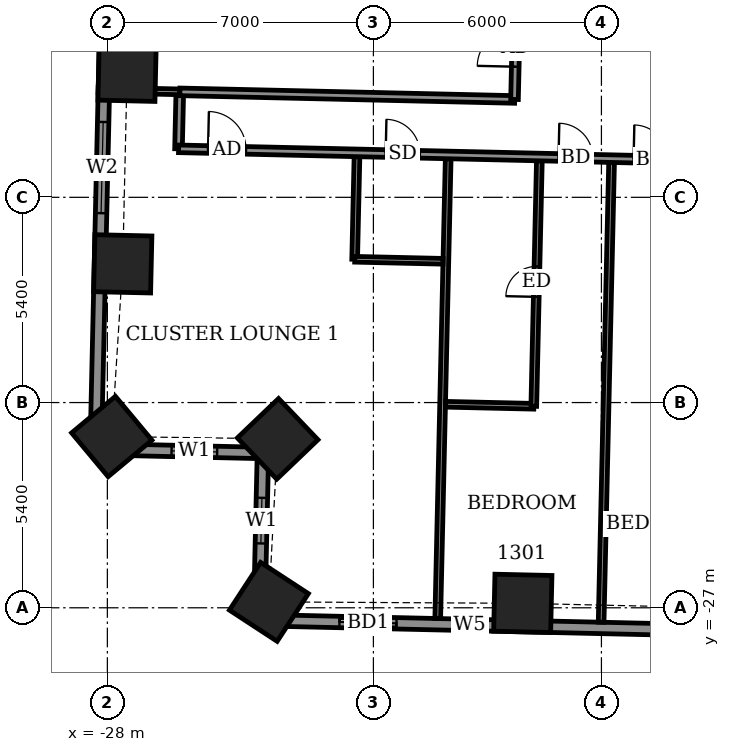
"""IFC4 building model, lengths in metres.
Left out: names, types, materials, properties, quantities, classifications, styles, units other than length and angle.
Written with IfcOpenShell. Run it as: python <this file> out.ifc"""

import sys

from ifc_helpers import new_model, si_unit, direction, frame, frame_2d, origin, origin_2d, place, context, subcontext, project, spatial, rectangle, extrude, element, fill, save


model = new_model("IFC4")
c1 = context("Model", 3, precision=1e-05, world=origin(), true_north=direction((0.0, 1.0)))
c2 = subcontext(c1, "Body", "Model", "MODEL_VIEW")
j1 = project(units=[si_unit("LENGTHUNIT", "METRE"), si_unit("PLANEANGLEUNIT", "RADIAN")], contexts=[c1])
p1 = place(None, origin())
s1 = spatial("IfcSite", under=j1, at=p1, CompositionType="ELEMENT")
p2 = place(p1, origin())
s2 = spatial("IfcBuilding", under=s1, at=p2, CompositionType="ELEMENT")
p3 = place(p2, frame((0.0, 0.0, 56.7)))
s3 = spatial("IfcBuildingStorey", under=s2, at=p3, CompositionType="ELEMENT", Elevation=56.7)
for number, where, z_axis, x_axis in (
    (1, (-27.481, -12.91, -0.55), (0.0, 0.0, 1.0), (-0.023, -1.0, 0.0)),
    (2, (-27.595, -17.95, -0.55), (0.0, 0.0, 1.0), (-0.023, -1.0, 0.0)),
    (3, (-27.884, -22.494, -0.55), (0.0, 0.0, 1.0), (0.64, -0.768, 0.0)),
    (4, (-23.519, -22.555, -0.55), (0.0, 0.0, 1.0), (0.691, -0.723, 0.0)),
    (5, (-23.75, -26.844, -0.55), (0.0, 0.0, 1.0), (0.837, -0.547, 0.0)),
    (6, (-17.069, -26.883, -0.55), (0.0, 0.0, 1.0), (1.0, -0.023, 0.0)),
):
    element("IfcColumn", number, at=place(p3, frame(where, z_axis=z_axis, x_axis=x_axis)), inside=s3, PredefinedType="COLUMN", context=c2, shape_type="SweptSolid", body=[
        extrude(rectangle(XDim=1.5, YDim=1.5, at=origin_2d()), origin(), (0.0, 0.0, 1.0), 3.6),
    ])
p4 = place(p3, frame((-27.965, -7.802, 0.0), z_axis=(0.0, 0.0, 1.0), x_axis=(-0.02267786199, -0.999742824218, 0.0)))
e7 = element("IfcWall", 7, at=p4, inside=s3, PredefinedType="SOLIDWALL", context=c2, shape_type="SweptSolid", body=[
    extrude(rectangle(XDim=15.029, YDim=0.3, at=frame_2d((7.514, 0.0))), origin(), (0.0, 0.0, 1.0), 3.05),
])
p5 = place(p4, frame((1.826, 0.0, 0.0)))
e8 = element("IfcOpeningElement", 8, at=p5, cuts=e7, PredefinedType="OPENING", context=c2, shape_type="SweptSolid", body=[
    extrude(rectangle(XDim=1.5, YDim=2.4, at=frame_2d((0.75, 1.2))), frame((0.0, 0.16, 0.0), z_axis=(0.0, -1.0, 0.0), x_axis=(1.0, 0.0, 0.0)), (0.0, 0.0, 1.0), 0.32),
])
p6 = place(p4, frame((6.417, 0.0, 0.9)))
e9 = element("IfcOpeningElement", 9, at=p6, cuts=e7, PredefinedType="OPENING", context=c2, shape_type="SweptSolid", body=[
    extrude(rectangle(XDim=2.4, YDim=1.5, at=frame_2d((1.2, 0.75))), frame((0.0, 0.16, 0.0), z_axis=(0.0, -1.0, 0.0), x_axis=(1.0, 0.0, 0.0)), (0.0, 0.0, 1.0), 0.32),
])
p7 = place(p3, frame((-28.306, -22.827, 0.0), z_axis=(0.0, 0.0, 1.0), x_axis=(0.999741204967, -0.022749133868, 0.0)))
e10 = element("IfcWall", 10, at=p7, inside=s3, PredefinedType="SOLIDWALL", context=c2, shape_type="SweptSolid", body=[
    extrude(rectangle(XDim=4.4, YDim=0.3, at=frame_2d((2.2, 0.0))), origin(), (0.0, 0.0, 1.0), 3.05),
])
p8 = place(p7, frame((1.996, 0.0, 0.9)))
e11 = element("IfcOpeningElement", 11, at=p8, cuts=e10, PredefinedType="OPENING", context=c2, shape_type="SweptSolid", body=[
    extrude(rectangle(XDim=1.2, YDim=1.5, at=frame_2d((0.6, 0.75))), frame((0.0, 0.16, 0.0), z_axis=(0.0, -1.0, 0.0), x_axis=(1.0, 0.0, 0.0)), (0.0, 0.0, 1.0), 0.32),
])
p9 = place(p3, frame((-23.907, -22.927, 0.0), z_axis=(0.0, 0.0, 1.0), x_axis=(-0.022749133868, -0.999741204967, 0.0)))
e12 = element("IfcWall", 12, at=p9, inside=s3, PredefinedType="SOLIDWALL", context=c2, shape_type="SweptSolid", body=[
    extrude(rectangle(XDim=4.4, YDim=0.3, at=frame_2d((2.2, 0.0))), origin(), (0.0, 0.0, 1.0), 2.55),
])
p10 = place(p9, frame((1.18, 0.0, 0.9)))
e13 = element("IfcOpeningElement", 13, at=p10, cuts=e12, PredefinedType="OPENING", context=c2, shape_type="SweptSolid", body=[
    extrude(rectangle(XDim=1.2, YDim=1.5, at=frame_2d((0.6, 0.75))), frame((0.0, 0.16, 0.0), z_axis=(0.0, -1.0, 0.0), x_axis=(1.0, 0.0, 0.0)), (0.0, 0.0, 1.0), 0.32),
])
p11 = place(p3, frame((-24.007, -27.326, 0.0), z_axis=(0.0, 0.0, 1.0), x_axis=(0.999742536491, -0.022690542744, 0.0)))
e14 = element("IfcWall", 14, at=p11, inside=s3, PredefinedType="SOLIDWALL", context=c2, shape_type="SweptSolid", body=[
    extrude(rectangle(XDim=49.236, YDim=0.3, at=frame_2d((24.618, 0.0))), origin(), (0.0, 0.0, 1.0), 3.05),
])
p12 = place(p11, frame((2.115, 0.0, 0.0)))
e15 = element("IfcOpeningElement", 15, at=p12, cuts=e14, PredefinedType="OPENING", context=c2, shape_type="SweptSolid", body=[
    extrude(rectangle(XDim=1.5, YDim=2.4, at=frame_2d((0.75, 1.2))), frame((0.0, 0.16, 0.0), z_axis=(0.0, -1.0, 0.0), x_axis=(1.0, 0.0, 0.0)), (0.0, 0.0, 1.0), 0.32),
])
p13 = place(p11, frame((5.088, 0.0, 0.9)))
e16 = element("IfcOpeningElement", 16, at=p13, cuts=e14, PredefinedType="OPENING", context=c2, shape_type="SweptSolid", body=[
    extrude(rectangle(XDim=0.9, YDim=1.5, at=frame_2d((0.45, 0.75))), frame((0.0, 0.16, 0.0), z_axis=(0.0, -1.0, 0.0), x_axis=(1.0, 0.0, 0.0)), (0.0, 0.0, 1.0), 0.32),
])
p14 = place(p11, frame((10.475, 0.0, 0.0)))
e17 = element("IfcOpeningElement", 17, at=p14, cuts=e14, PredefinedType="OPENING", context=c2, shape_type="SweptSolid", body=[
    extrude(rectangle(XDim=1.5, YDim=2.4, at=frame_2d((0.75, 1.2))), frame((0.0, 0.16, 0.0), z_axis=(0.0, -1.0, 0.0), x_axis=(1.0, 0.0, 0.0)), (0.0, 0.0, 1.0), 0.32),
])
p15 = place(p11, frame((15.477, 0.0, 0.0)))
e18 = element("IfcOpeningElement", 18, at=p15, cuts=e14, PredefinedType="OPENING", context=c2, shape_type="SweptSolid", body=[
    extrude(rectangle(XDim=1.5, YDim=2.4, at=frame_2d((0.75, 1.2))), frame((0.0, 0.16, 0.0), z_axis=(0.0, -1.0, 0.0), x_axis=(1.0, 0.0, 0.0)), (0.0, 0.0, 1.0), 0.32),
])
p16 = place(p11, frame((18.515, 0.0, 0.0)))
e19 = element("IfcOpeningElement", 19, at=p16, cuts=e14, PredefinedType="OPENING", context=c2, shape_type="SweptSolid", body=[
    extrude(rectangle(XDim=1.5, YDim=2.4, at=frame_2d((0.75, 1.2))), frame((0.0, 0.16, 0.0), z_axis=(0.0, -1.0, 0.0), x_axis=(1.0, 0.0, 0.0)), (0.0, 0.0, 1.0), 0.32),
])
p17 = place(p11, frame((23.825, 0.0, 0.0)))
e20 = element("IfcOpeningElement", 20, at=p17, cuts=e14, PredefinedType="OPENING", context=c2, shape_type="SweptSolid", body=[
    extrude(rectangle(XDim=1.5, YDim=2.4, at=frame_2d((0.75, 1.2))), frame((0.0, 0.16, 0.0), z_axis=(0.0, -1.0, 0.0), x_axis=(1.0, 0.0, 0.0)), (0.0, 0.0, 1.0), 0.32),
])
p18 = place(p11, frame((29.128, 0.0, 0.0)))
e21 = element("IfcOpeningElement", 21, at=p18, cuts=e14, PredefinedType="OPENING", context=c2, shape_type="SweptSolid", body=[
    extrude(rectangle(XDim=1.5, YDim=2.4, at=frame_2d((0.75, 1.2))), frame((0.0, 0.16, 0.0), z_axis=(0.0, -1.0, 0.0), x_axis=(1.0, 0.0, 0.0)), (0.0, 0.0, 1.0), 0.32),
])
p19 = place(p11, frame((32.166, 0.0, 0.0)))
e22 = element("IfcOpeningElement", 22, at=p19, cuts=e14, PredefinedType="OPENING", context=c2, shape_type="SweptSolid", body=[
    extrude(rectangle(XDim=1.5, YDim=2.4, at=frame_2d((0.75, 1.2))), frame((0.0, 0.16, 0.0), z_axis=(0.0, -1.0, 0.0), x_axis=(1.0, 0.0, 0.0)), (0.0, 0.0, 1.0), 0.32),
])
p20 = place(p11, frame((37.091, 0.0, 0.0)))
e23 = element("IfcOpeningElement", 23, at=p20, cuts=e14, PredefinedType="OPENING", context=c2, shape_type="SweptSolid", body=[
    extrude(rectangle(XDim=1.5, YDim=2.4, at=frame_2d((0.75, 1.2))), frame((0.0, 0.16, 0.0), z_axis=(0.0, -1.0, 0.0), x_axis=(1.0, 0.0, 0.0)), (0.0, 0.0, 1.0), 0.32),
])
p21 = place(p11, frame((40.205, 0.0, 0.0)))
e24 = element("IfcOpeningElement", 24, at=p21, cuts=e14, PredefinedType="OPENING", context=c2, shape_type="SweptSolid", body=[
    extrude(rectangle(XDim=1.2, YDim=2.4, at=frame_2d((0.6, 1.2))), frame((0.0, 0.16, 0.0), z_axis=(0.0, -1.0, 0.0), x_axis=(1.0, 0.0, 0.0)), (0.0, 0.0, 1.0), 0.32),
])
p22 = place(p11, frame((45.047, 0.0, 0.9)))
e25 = element("IfcOpeningElement", 25, at=p22, cuts=e14, PredefinedType="OPENING", context=c2, shape_type="SweptSolid", body=[
    extrude(rectangle(XDim=2.4, YDim=1.5, at=frame_2d((1.2, 0.75))), frame((0.0, 0.16, 0.0), z_axis=(0.0, -1.0, 0.0), x_axis=(1.0, 0.0, 0.0)), (0.0, 0.0, 1.0), 0.32),
])
p23 = place(p3, frame((-19.307, -27.283, 0.0), z_axis=(0.0, 0.0, 1.0), x_axis=(0.022717280737, 0.999741929278, 0.0)))
e26 = element("IfcWall", 26, at=p23, inside=s3, PredefinedType="PARTITIONING", context=c2, shape_type="SweptSolid", body=[
    extrude(rectangle(XDim=12.101, YDim=0.15, at=frame_2d((6.051, 0.0))), origin(), (0.0, 0.0, 1.0), 2.55),
])
p24 = place(p3, frame((-15.008, -27.38, 0.0), z_axis=(0.0, 0.0, 1.0), x_axis=(0.02273928012, 0.99974142914, 0.0)))
e27 = element("IfcWall", 27, at=p24, inside=s3, PredefinedType="PARTITIONING", context=c2, shape_type="SweptSolid", body=[
    extrude(rectangle(XDim=12.1, YDim=0.15, at=frame_2d((6.05, 0.0))), origin(), (0.0, 0.0, 1.0), 2.55),
])
p25 = place(p3, frame((-19.102, -21.645, 0.0), z_axis=(0.0, 0.0, 1.0), x_axis=(0.999740260747, -0.02279059109, 0.0)))
e28 = element("IfcWall", 28, at=p25, inside=s3, PredefinedType="PARTITIONING", context=c2, shape_type="SweptSolid", body=[
    extrude(rectangle(XDim=2.324, YDim=0.15, at=frame_2d((1.162, 0.0))), origin(), (0.0, 0.0, 1.0), 3.05),
])
p26 = place(p3, frame((-16.78, -21.698, 0.0), z_axis=(0.0, 0.0, 1.0), x_axis=(0.022752312182, 0.999741132639, 0.0)))
e29 = element("IfcWall", 29, at=p26, inside=s3, PredefinedType="PARTITIONING", context=c2, shape_type="SweptSolid", body=[
    extrude(rectangle(XDim=6.46, YDim=0.15, at=frame_2d((3.23, 0.0))), origin(), (0.0, 0.0, 1.0), 3.05),
])
p27 = place(p26, frame((2.88, 0.0, 0.0)))
e30 = element("IfcOpeningElement", 30, at=p27, cuts=e29, PredefinedType="OPENING", context=c2, shape_type="SweptSolid", body=[
    extrude(rectangle(XDim=0.8, YDim=2.1, at=frame_2d((0.4, 1.05))), frame((0.0, 0.085, 0.0), z_axis=(0.0, -1.0, 0.0), x_axis=(1.0, 0.0, 0.0)), (0.0, 0.0, 1.0), 0.17),
])
p28 = place(p3, frame((-21.493, -17.83, 0.0), z_axis=(0.0, 0.0, 1.0), x_axis=(0.02260842146, 0.999744396973, 0.0)))
e31 = element("IfcWall", 31, at=p28, inside=s3, PredefinedType="PARTITIONING", context=c2, shape_type="SweptSolid", body=[
    extrude(rectangle(XDim=2.7, YDim=0.15, at=frame_2d((1.35, 0.0))), origin(), (0.0, 0.0, 1.0), 3.05),
])
p29 = place(p3, frame((-21.491, -17.83, 0.0), z_axis=(0.0, 0.0, 1.0), x_axis=(0.999740260747, -0.02279059109, 0.0)))
e32 = element("IfcWall", 32, at=p29, inside=s3, PredefinedType="PARTITIONING", context=c2, shape_type="SweptSolid", body=[
    extrude(rectangle(XDim=2.324, YDim=0.15, at=frame_2d((1.162, 0.0))), origin(), (0.0, 0.0, 1.0), 3.05),
])
p30 = place(p3, frame((-26.128, -14.924, 0.0), z_axis=(0.0, 0.0, 1.0), x_axis=(0.022632637625, 0.99974384905, 0.0)))
e33 = element("IfcWall", 33, at=p30, inside=s3, PredefinedType="PARTITIONING", context=c2, shape_type="SweptSolid", body=[
    extrude(rectangle(XDim=1.5, YDim=0.2, at=frame_2d((0.75, 0.0))), origin(), (0.0, 0.0, 1.0), 3.05),
])
p31 = place(p3, frame((-26.126, -14.924, 0.0), z_axis=(0.0, 0.0, 1.0), x_axis=(0.999742687583, -0.0226838847, 0.0)))
e34 = element("IfcWall", 34, at=p31, inside=s3, PredefinedType="PARTITIONING", context=c2, shape_type="SweptSolid", body=[
    extrude(rectangle(XDim=54.836, YDim=0.2, at=frame_2d((27.418, 0.0))), origin(), (0.0, 0.0, 1.0), 3.05),
])
p32 = place(p31, frame((0.775, 0.0, 0.0)))
e35 = element("IfcOpeningElement", 35, at=p32, cuts=e34, PredefinedType="OPENING", context=c2, shape_type="SweptSolid", body=[
    extrude(rectangle(XDim=1.0, YDim=2.1, at=frame_2d((0.5, 1.05))), frame((0.0, 0.11, 0.0), z_axis=(0.0, -1.0, 0.0), x_axis=(1.0, 0.0, 0.0)), (0.0, 0.0, 1.0), 0.22),
])
p33 = place(p31, frame((5.45, 0.0, 0.0)))
e36 = element("IfcOpeningElement", 36, at=p33, cuts=e34, PredefinedType="OPENING", context=c2, shape_type="SweptSolid", body=[
    extrude(rectangle(XDim=0.9, YDim=2.1, at=frame_2d((0.45, 1.05))), frame((0.0, 0.11, 0.0), z_axis=(0.0, -1.0, 0.0), x_axis=(1.0, 0.0, 0.0)), (0.0, 0.0, 1.0), 0.22),
])
p34 = place(p31, frame((10.0, 0.0, 0.0)))
e37 = element("IfcOpeningElement", 37, at=p34, cuts=e34, PredefinedType="OPENING", context=c2, shape_type="SweptSolid", body=[
    extrude(rectangle(XDim=0.9, YDim=2.1, at=frame_2d((0.45, 1.05))), frame((0.0, 0.11, 0.0), z_axis=(0.0, -1.0, 0.0), x_axis=(1.0, 0.0, 0.0)), (0.0, 0.0, 1.0), 0.22),
])
p35 = place(p31, frame((11.975, 0.0, 0.0)))
e38 = element("IfcOpeningElement", 38, at=p35, cuts=e34, PredefinedType="OPENING", context=c2, shape_type="SweptSolid", body=[
    extrude(rectangle(XDim=0.9, YDim=2.1, at=frame_2d((0.45, 1.05))), frame((0.0, 0.11, 0.0), z_axis=(0.0, -1.0, 0.0), x_axis=(1.0, 0.0, 0.0)), (0.0, 0.0, 1.0), 0.22),
])
p36 = place(p31, frame((18.85, 0.0, 0.0)))
e39 = element("IfcOpeningElement", 39, at=p36, cuts=e34, PredefinedType="OPENING", context=c2, shape_type="SweptSolid", body=[
    extrude(rectangle(XDim=0.9, YDim=2.1, at=frame_2d((0.45, 1.05))), frame((0.0, 0.11, 0.0), z_axis=(0.0, -1.0, 0.0), x_axis=(1.0, 0.0, 0.0)), (0.0, 0.0, 1.0), 0.22),
])
p37 = place(p31, frame((20.9, 0.0, 0.0)))
e40 = element("IfcOpeningElement", 40, at=p37, cuts=e34, PredefinedType="OPENING", context=c2, shape_type="SweptSolid", body=[
    extrude(rectangle(XDim=0.9, YDim=2.1, at=frame_2d((0.45, 1.05))), frame((0.0, 0.11, 0.0), z_axis=(0.0, -1.0, 0.0), x_axis=(1.0, 0.0, 0.0)), (0.0, 0.0, 1.0), 0.22),
])
p38 = place(p31, frame((27.725, 0.0, 0.0)))
e41 = element("IfcOpeningElement", 41, at=p38, cuts=e34, PredefinedType="OPENING", context=c2, shape_type="SweptSolid", body=[
    extrude(rectangle(XDim=0.9, YDim=2.1, at=frame_2d((0.45, 1.05))), frame((0.0, 0.11, 0.0), z_axis=(0.0, -1.0, 0.0), x_axis=(1.0, 0.0, 0.0)), (0.0, 0.0, 1.0), 0.22),
])
p39 = place(p31, frame((29.7, 0.0, 0.0)))
e42 = element("IfcOpeningElement", 42, at=p39, cuts=e34, PredefinedType="OPENING", context=c2, shape_type="SweptSolid", body=[
    extrude(rectangle(XDim=0.9, YDim=2.1, at=frame_2d((0.45, 1.05))), frame((0.0, 0.11, 0.0), z_axis=(0.0, -1.0, 0.0), x_axis=(1.0, 0.0, 0.0)), (0.0, 0.0, 1.0), 0.22),
])
p40 = place(p31, frame((36.5, 0.0, 0.0)))
e43 = element("IfcOpeningElement", 43, at=p40, cuts=e34, PredefinedType="OPENING", context=c2, shape_type="SweptSolid", body=[
    extrude(rectangle(XDim=0.9, YDim=2.1, at=frame_2d((0.45, 1.05))), frame((0.0, 0.11, 0.0), z_axis=(0.0, -1.0, 0.0), x_axis=(1.0, 0.0, 0.0)), (0.0, 0.0, 1.0), 0.22),
])
p41 = place(p31, frame((38.525, 0.0, 0.0)))
e44 = element("IfcOpeningElement", 44, at=p41, cuts=e34, PredefinedType="OPENING", context=c2, shape_type="SweptSolid", body=[
    extrude(rectangle(XDim=0.9, YDim=2.1, at=frame_2d((0.45, 1.05))), frame((0.0, 0.11, 0.0), z_axis=(0.0, -1.0, 0.0), x_axis=(1.0, 0.0, 0.0)), (0.0, 0.0, 1.0), 0.22),
])
p42 = place(p31, frame((45.325, 0.0, 0.0)))
e45 = element("IfcOpeningElement", 45, at=p42, cuts=e34, PredefinedType="OPENING", context=c2, shape_type="SweptSolid", body=[
    extrude(rectangle(XDim=0.9, YDim=2.1, at=frame_2d((0.45, 1.05))), frame((0.0, 0.11, 0.0), z_axis=(0.0, -1.0, 0.0), x_axis=(1.0, 0.0, 0.0)), (0.0, 0.0, 1.0), 0.22),
])
p43 = place(p31, frame((52.593, 0.0, 0.0)))
e46 = element("IfcOpeningElement", 46, at=p43, cuts=e34, PredefinedType="OPENING", context=c2, shape_type="SweptSolid", body=[
    extrude(rectangle(XDim=1.0, YDim=2.1, at=frame_2d((0.5, 1.05))), frame((0.0, 0.11, 0.0), z_axis=(0.0, -1.0, 0.0), x_axis=(1.0, 0.0, 0.0)), (0.0, 0.0, 1.0), 0.22),
])
p44 = place(p31, frame((47.55, 0.0, 0.0)))
e47 = element("IfcOpeningElement", 47, at=p44, cuts=e34, PredefinedType="OPENING", context=c2, shape_type="SweptSolid", body=[
    extrude(rectangle(XDim=0.9, YDim=2.1, at=frame_2d((0.45, 1.05))), frame((0.0, 0.11, 0.0), z_axis=(0.0, -1.0, 0.0), x_axis=(1.0, 0.0, 0.0)), (0.0, 0.0, 1.0), 0.22),
])
p45 = place(p3, frame((-28.242, -13.376, 0.0), z_axis=(0.0, 0.0, 1.0), x_axis=(0.999739603527, -0.022819402715, 0.0)))
e48 = element("IfcWall", 48, at=p45, inside=s3, PredefinedType="PARTITIONING", context=c2, shape_type="SweptSolid", body=[
    extrude(rectangle(XDim=2.15, YDim=0.15, at=frame_2d((1.075, 0.0))), origin(), (0.0, 0.0, 1.0), 3.05),
])
p46 = place(p3, frame((-26.092, -13.425, 0.0), z_axis=(0.0, 0.0, 1.0), x_axis=(0.999742550188, -0.022689939273, 0.0)))
e49 = element("IfcWall", 49, at=p46, inside=s3, PredefinedType="PARTITIONING", context=c2, shape_type="SweptSolid", body=[
    extrude(rectangle(XDim=8.812, YDim=0.2, at=frame_2d((4.406, 0.0))), origin(), (0.0, 0.0, 1.0), 3.05),
])
p47 = place(p3, frame((-17.287, -13.625, 0.0), z_axis=(0.0, 0.0, 1.0), x_axis=(0.022712214871, 0.999742044377, 0.0)))
e50 = element("IfcWall", 50, at=p47, inside=s3, PredefinedType="PARTITIONING", context=c2, shape_type="SweptSolid", body=[
    extrude(rectangle(XDim=26.551, YDim=0.2, at=frame_2d((13.275, 0.0))), origin(), (0.0, 0.0, 1.0), 3.05),
])
p48 = place(p47, frame((14.15, 0.0, 0.0)))
e51 = element("IfcOpeningElement", 51, at=p48, cuts=e50, PredefinedType="OPENING", context=c2, shape_type="SweptSolid", body=[
    extrude(rectangle(XDim=1.0, YDim=2.1, at=frame_2d((0.5, 1.05))), frame((0.0, 0.11, 0.0), z_axis=(0.0, -1.0, 0.0), x_axis=(1.0, 0.0, 0.0)), (0.0, 0.0, 1.0), 0.22),
])
p49 = place(p47, frame((17.625, 0.0, 0.0)))
e52 = element("IfcOpeningElement", 52, at=p49, cuts=e50, PredefinedType="OPENING", context=c2, shape_type="SweptSolid", body=[
    extrude(rectangle(XDim=0.9, YDim=2.1, at=frame_2d((0.45, 1.05))), frame((0.0, 0.11, 0.0), z_axis=(0.0, -1.0, 0.0), x_axis=(1.0, 0.0, 0.0)), (0.0, 0.0, 1.0), 0.22),
])
p50 = place(p47, frame((9.875, 0.0, 0.0)))
e53 = element("IfcOpeningElement", 53, at=p50, cuts=e50, PredefinedType="OPENING", context=c2, shape_type="SweptSolid", body=[
    extrude(rectangle(XDim=1.0, YDim=2.1, at=frame_2d((0.5, 1.05))), frame((0.0, 0.11, 0.0), z_axis=(0.0, -1.0, 0.0), x_axis=(1.0, 0.0, 0.0)), (0.0, 0.0, 1.0), 0.22),
])
p51 = place(p47, frame((6.475, 0.0, 0.0)))
e54 = element("IfcOpeningElement", 54, at=p51, cuts=e50, PredefinedType="OPENING", context=c2, shape_type="SweptSolid", body=[
    extrude(rectangle(XDim=0.9, YDim=2.1, at=frame_2d((0.45, 1.05))), frame((0.0, 0.11, 0.0), z_axis=(0.0, -1.0, 0.0), x_axis=(1.0, 0.0, 0.0)), (0.0, 0.0, 1.0), 0.22),
])
p52 = place(p47, frame((0.862, 0.0, 0.0)))
e55 = element("IfcOpeningElement", 55, at=p52, cuts=e50, PredefinedType="OPENING", context=c2, shape_type="SweptSolid", body=[
    extrude(rectangle(XDim=1.0, YDim=2.1, at=frame_2d((0.5, 1.05))), frame((0.0, 0.11, 0.0), z_axis=(0.0, -1.0, 0.0), x_axis=(1.0, 0.0, 0.0)), (0.0, 0.0, 1.0), 0.22),
])
p53 = place(p47, frame((3.675, 0.0, 0.0)))
e56 = element("IfcOpeningElement", 56, at=p53, cuts=e50, PredefinedType="OPENING", context=c2, shape_type="SweptSolid", body=[
    extrude(rectangle(XDim=0.9, YDim=2.1, at=frame_2d((0.45, 1.05))), frame((0.0, 0.11, 0.0), z_axis=(0.0, -1.0, 0.0), x_axis=(1.0, 0.0, 0.0)), (0.0, 0.0, 1.0), 0.22),
])
p54 = place(p6, origin())
e57 = element("IfcWindow", 57, at=p54, inside=s3, PartitioningType="DOUBLE_PANEL_VERTICAL", PredefinedType="WINDOW", context=c2, shape_type="SweptSolid", body=[
    extrude(rectangle(XDim=2.4, YDim=1.5, at=frame_2d((1.2, 0.75))), frame((0.0, 0.03, 0.0), z_axis=(0.0, -1.0, 0.0), x_axis=(1.0, 0.0, 0.0)), (0.0, 0.0, 1.0), 0.06),
])
fill(e9, e57)
p55 = place(p8, origin())
e58 = element("IfcWindow", 58, at=p55, inside=s3, PartitioningType="SINGLE_PANEL", PredefinedType="WINDOW", context=c2, shape_type="SweptSolid", body=[
    extrude(rectangle(XDim=1.2, YDim=1.5, at=frame_2d((0.6, 0.75))), frame((0.0, 0.03, 0.0), z_axis=(0.0, -1.0, 0.0), x_axis=(1.0, 0.0, 0.0)), (0.0, 0.0, 1.0), 0.06),
])
fill(e11, e58)
p56 = place(p10, origin())
e59 = element("IfcWindow", 59, at=p56, inside=s3, PartitioningType="SINGLE_PANEL", PredefinedType="WINDOW", context=c2, shape_type="SweptSolid", body=[
    extrude(rectangle(XDim=1.2, YDim=1.5, at=frame_2d((0.6, 0.75))), frame((0.0, 0.03, 0.0), z_axis=(0.0, -1.0, 0.0), x_axis=(1.0, 0.0, 0.0)), (0.0, 0.0, 1.0), 0.06),
])
fill(e13, e59)
p57 = place(p12, origin())
e60 = element("IfcDoor", 60, at=p57, inside=s3, OperationType="SLIDING_TO_LEFT", PredefinedType="DOOR", context=c2, shape_type="SweptSolid", body=[
    extrude(rectangle(XDim=1.5, YDim=2.4, at=frame_2d((0.75, 1.2))), frame((0.0, 0.025, 0.0), z_axis=(0.0, -1.0, 0.0), x_axis=(1.0, 0.0, 0.0)), (0.0, 0.0, 1.0), 0.05),
])
fill(e15, e60)
p58 = place(p13, origin())
e61 = element("IfcWindow", 61, at=p58, inside=s3, PartitioningType="SINGLE_PANEL", PredefinedType="WINDOW", context=c2, shape_type="SweptSolid", body=[
    extrude(rectangle(XDim=0.9, YDim=1.5, at=frame_2d((0.45, 0.75))), frame((0.0, 0.03, 0.0), z_axis=(0.0, -1.0, 0.0), x_axis=(1.0, 0.0, 0.0)), (0.0, 0.0, 1.0), 0.06),
])
fill(e16, e61)
p59 = place(p32, origin())
e62 = element("IfcDoor", 62, at=p59, inside=s3, OperationType="SINGLE_SWING_LEFT", PredefinedType="DOOR", context=c2, shape_type="SweptSolid", body=[
    extrude(rectangle(XDim=1.0, YDim=2.1, at=frame_2d((0.5, 1.05))), frame((0.0, 0.025, 0.0), z_axis=(0.0, -1.0, 0.0), x_axis=(1.0, 0.0, 0.0)), (0.0, 0.0, 1.0), 0.05),
])
fill(e35, e62)
p60 = place(p33, origin())
e63 = element("IfcDoor", 63, at=p60, inside=s3, OperationType="SINGLE_SWING_LEFT", PredefinedType="DOOR", context=c2, shape_type="SweptSolid", body=[
    extrude(rectangle(XDim=0.9, YDim=2.1, at=frame_2d((0.45, 1.05))), frame((0.0, 0.025, 0.0), z_axis=(0.0, -1.0, 0.0), x_axis=(1.0, 0.0, 0.0)), (0.0, 0.0, 1.0), 0.05),
])
fill(e36, e63)
p61 = place(p34, origin())
e64 = element("IfcDoor", 64, at=p61, inside=s3, OperationType="SINGLE_SWING_LEFT", PredefinedType="DOOR", context=c2, shape_type="SweptSolid", body=[
    extrude(rectangle(XDim=0.9, YDim=2.1, at=frame_2d((0.45, 1.05))), frame((0.0, 0.025, 0.0), z_axis=(0.0, -1.0, 0.0), x_axis=(1.0, 0.0, 0.0)), (0.0, 0.0, 1.0), 0.05),
])
fill(e37, e64)
p62 = place(p27, origin())
e65 = element("IfcDoor", 65, at=p62, inside=s3, OperationType="SINGLE_SWING_LEFT", PredefinedType="DOOR", context=c2, shape_type="SweptSolid", body=[
    extrude(rectangle(XDim=0.8, YDim=2.1, at=frame_2d((0.4, 1.05))), frame((0.0, 0.025, 0.0), z_axis=(0.0, -1.0, 0.0), x_axis=(1.0, 0.0, 0.0)), (0.0, 0.0, 1.0), 0.05),
])
fill(e30, e65)
p63 = place(p35, origin())
e66 = element("IfcDoor", 66, at=p63, inside=s3, OperationType="SINGLE_SWING_RIGHT", PredefinedType="DOOR", context=c2, shape_type="SweptSolid", body=[
    extrude(rectangle(XDim=0.9, YDim=2.1, at=frame_2d((0.45, 1.05))), frame((0.0, 0.025, 0.0), z_axis=(0.0, -1.0, 0.0), x_axis=(1.0, 0.0, 0.0)), (0.0, 0.0, 1.0), 0.05),
])
fill(e38, e66)
p64 = place(p52, origin())
e67 = element("IfcDoor", 67, at=p64, inside=s3, OperationType="SINGLE_SWING_RIGHT", PredefinedType="DOOR", context=c2, shape_type="SweptSolid", body=[
    extrude(rectangle(XDim=1.0, YDim=2.1, at=frame_2d((0.5, 1.05))), frame((0.0, 0.025, 0.0), z_axis=(0.0, -1.0, 0.0), x_axis=(1.0, 0.0, 0.0)), (0.0, 0.0, 1.0), 0.05),
])
fill(e55, e67)
save(model, sys.argv[1])
